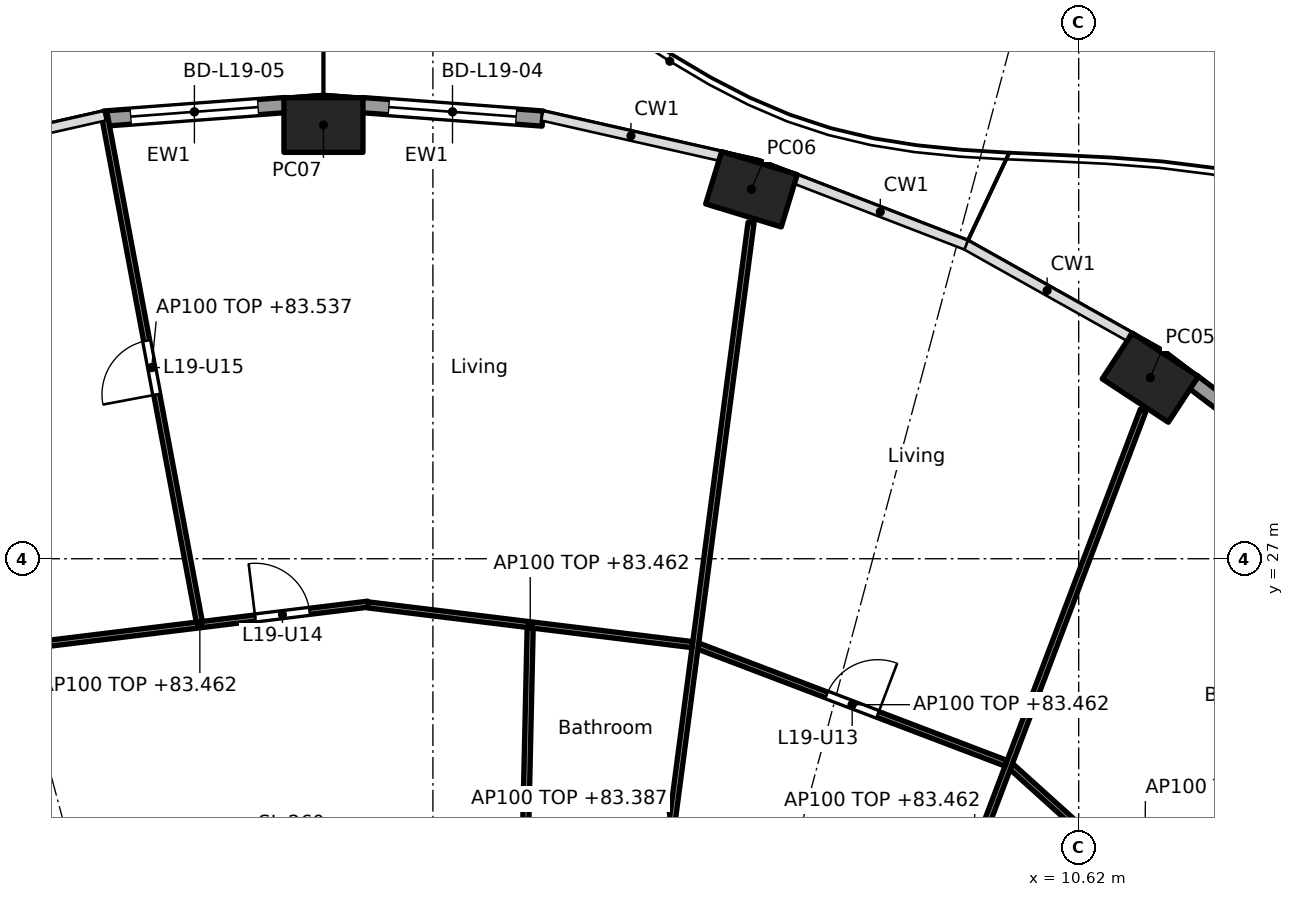
"""IFC4 building model, lengths in metres.
Left out: names, types, materials, properties, quantities, classifications, styles, units other than length and angle.
Written with IfcOpenShell. Run it as: python <this file> out.ifc"""

import sys

from ifc_helpers import new_model, si_unit, direction, frame, frame_2d, origin, origin_2d, place, context, subcontext, project, spatial, rectangle, hollow_rectangle, extrude, element, fill, save


model = new_model("IFC4")
c1 = context("Model", 3, precision=1e-05, world=origin(), true_north=direction((0.0, 1.0)))
c2 = subcontext(c1, "Body", "Model", "MODEL_VIEW")
j1 = project(units=[si_unit("LENGTHUNIT", "METRE"), si_unit("PLANEANGLEUNIT", "RADIAN")], contexts=[c1])
p1 = place(None, origin())
s1 = spatial("IfcSite", under=j1, at=p1, CompositionType="ELEMENT")
p2 = place(p1, origin())
s2 = spatial("IfcBuilding", under=s1, at=p2, CompositionType="ELEMENT")
p3 = place(p2, frame((0.0, 0.0, 80.7)))
s3 = spatial("IfcBuildingStorey", under=s2, at=p3, CompositionType="ELEMENT", Elevation=80.7)
for number, where, z_axis, x_axis in (
    (1, (11.798, 29.978, 0.0), (0.0, 0.0, 1.0), (-0.836, 0.549, 0.0)),
    (2, (5.239, 33.076, 0.0), (0.0, 0.0, 1.0), (-0.957, 0.292, 0.0)),
    (3, (-1.8, 34.133, 0.0), (0.0, 0.0, 1.0), (-1.0, 0.0, 0.0)),
):
    element("IfcColumn", number, at=place(p3, frame(where, z_axis=z_axis, x_axis=x_axis)), inside=s3, PredefinedType="COLUMN", context=c2, shape_type="SweptSolid", body=[
        extrude(hollow_rectangle(XDim=1.3, YDim=0.9, WallThickness=0.045, at=origin_2d()), origin(), (0.0, 0.0, 1.0), 3.7),
    ])
p4 = place(p3, frame((12.489, 29.917, 0.0), z_axis=(0.0, 0.0, 1.0), x_axis=(0.796037575978, -0.605247203736, 0.0)))
e4 = element("IfcWall", 4, at=p4, inside=s3, PredefinedType="SOLIDWALL", context=c2, shape_type="SweptSolid", body=[
    extrude(rectangle(XDim=3.134, YDim=0.25, at=frame_2d((1.567, 0.0))), origin(), (0.0, 0.0, 1.0), 3.44),
])
p5 = place(p4, frame((0.517, 0.0, 0.0)))
e5 = element("IfcOpeningElement", 5, at=p5, cuts=e4, PredefinedType="OPENING", context=c2, shape_type="SweptSolid", body=[
    extrude(rectangle(XDim=2.1, YDim=2.4, at=frame_2d((1.05, 1.2))), frame((0.0, 0.135, 0.0), z_axis=(0.0, -1.0, 0.0), x_axis=(1.0, 0.0, 0.0)), (0.0, 0.0, 1.0), 0.27),
])
p6 = place(p3, frame((-1.161, 34.46, 0.0), z_axis=(0.0, 0.0, 1.0), x_axis=(0.997232262224, -0.074349278273, 0.0)))
e6 = element("IfcWall", 6, at=p6, inside=s3, PredefinedType="SOLIDWALL", context=c2, shape_type="SweptSolid", body=[
    extrude(rectangle(XDim=2.975, YDim=0.25, at=frame_2d((1.488, 0.0))), origin(), (0.0, 0.0, 1.0), 3.44),
])
p7 = place(p6, frame((0.438, 0.0, 0.0)))
e7 = element("IfcOpeningElement", 7, at=p7, cuts=e6, PredefinedType="OPENING", context=c2, shape_type="SweptSolid", body=[
    extrude(rectangle(XDim=2.1, YDim=2.4, at=frame_2d((1.05, 1.2))), frame((0.0, 0.135, 0.0), z_axis=(0.0, -1.0, 0.0), x_axis=(1.0, 0.0, 0.0)), (0.0, 0.0, 1.0), 0.27),
])
p8 = place(p3, frame((-5.406, 34.239, 0.0), z_axis=(0.0, 0.0, 1.0), x_axis=(0.997231808538, 0.074355363224, 0.0)))
e8 = element("IfcWall", 8, at=p8, inside=s3, PredefinedType="SOLIDWALL", context=c2, shape_type="SweptSolid", body=[
    extrude(rectangle(XDim=2.975, YDim=0.25, at=frame_2d((1.487, 0.0))), origin(), (0.0, 0.0, 1.0), 3.44),
])
p9 = place(p8, frame((0.438, 0.0, 0.0)))
e9 = element("IfcOpeningElement", 9, at=p9, cuts=e8, PredefinedType="OPENING", context=c2, shape_type="SweptSolid", body=[
    extrude(rectangle(XDim=2.1, YDim=2.4, at=frame_2d((1.05, 1.2))), frame((0.0, 0.135, 0.0), z_axis=(0.0, -1.0, 0.0), x_axis=(1.0, 0.0, 0.0)), (0.0, 0.0, 1.0), 0.27),
])
p10 = place(p3, frame((7.713, 10.195, 0.0), z_axis=(0.0, 0.0, 1.0), x_axis=(0.552111071171, 0.833770571015, 0.0)))
e10 = element("IfcWall", 10, at=p10, inside=s3, PredefinedType="PARTITIONING", context=c2, shape_type="SweptSolid", body=[
    extrude(rectangle(XDim=17.208, YDim=0.1, at=frame_2d((8.604, 0.0))), origin(), (0.0, 0.0, 1.0), 2.687),
])
p11 = place(p10, frame((1.976, 0.0, 0.0)))
e11 = element("IfcOpeningElement", 11, at=p11, cuts=e10, PredefinedType="OPENING", context=c2, shape_type="SweptSolid", body=[
    extrude(rectangle(XDim=0.9, YDim=2.1, at=frame_2d((0.45, 1.05))), frame((0.0, 0.06, 0.0), z_axis=(0.0, -1.0, 0.0), x_axis=(1.0, 0.0, 0.0)), (0.0, 0.0, 1.0), 0.12),
])
p12 = place(p10, frame((7.611, 0.0, 0.0)))
e12 = element("IfcOpeningElement", 12, at=p12, cuts=e10, PredefinedType="OPENING", context=c2, shape_type="SweptSolid", body=[
    extrude(rectangle(XDim=0.9, YDim=2.1, at=frame_2d((0.45, 1.05))), frame((0.0, 0.06, 0.0), z_axis=(0.0, -1.0, 0.0), x_axis=(1.0, 0.0, 0.0)), (0.0, 0.0, 1.0), 0.12),
])
p13 = place(p3, frame((13.898, 19.625, 0.0), z_axis=(0.0, 0.0, 1.0), x_axis=(-0.742400132046, 0.669956747812, 0.0)))
e13 = element("IfcWall", 13, at=p13, inside=s3, PredefinedType="PARTITIONING", context=c2, shape_type="SweptSolid", body=[
    extrude(rectangle(XDim=5.911, YDim=0.1, at=frame_2d((2.956, 0.0))), origin(), (0.0, 0.0, 1.0), 2.762),
])
p14 = place(p13, frame((2.506, 0.0, 0.0)))
e14 = element("IfcOpeningElement", 14, at=p14, cuts=e13, PredefinedType="OPENING", context=c2, shape_type="SweptSolid", body=[
    extrude(rectangle(XDim=0.9, YDim=2.1, at=frame_2d((0.45, 1.05))), frame((0.0, 0.06, 0.0), z_axis=(0.0, -1.0, 0.0), x_axis=(1.0, 0.0, 0.0)), (0.0, 0.0, 1.0), 0.12),
])
p15 = place(p3, frame((6.141, 14.829, 0.0), z_axis=(0.0, 0.0, 1.0), x_axis=(0.354477134193, 0.935064682968, 0.0)))
e15 = element("IfcWall", 15, at=p15, inside=s3, PredefinedType="PARTITIONING", context=c2, shape_type="SweptSolid", body=[
    extrude(rectangle(XDim=15.626, YDim=0.1, at=frame_2d((7.813, 0.0))), origin(), (0.0, 0.0, 1.0), 2.762),
])
p16 = place(p15, frame((1.35, 0.0, 0.0)))
e16 = element("IfcOpeningElement", 16, at=p16, cuts=e15, PredefinedType="OPENING", context=c2, shape_type="SweptSolid", body=[
    extrude(rectangle(XDim=0.9, YDim=2.1, at=frame_2d((0.45, 1.05))), frame((0.0, 0.06, 0.0), z_axis=(0.0, -1.0, 0.0), x_axis=(1.0, 0.0, 0.0)), (0.0, 0.0, 1.0), 0.12),
])
p17 = place(p15, frame((5.606, 0.0, 0.0)))
e17 = element("IfcOpeningElement", 17, at=p17, cuts=e15, PredefinedType="OPENING", context=c2, shape_type="SweptSolid", body=[
    extrude(rectangle(XDim=0.9, YDim=2.1, at=frame_2d((0.45, 1.05))), frame((0.0, 0.06, 0.0), z_axis=(0.0, -1.0, 0.0), x_axis=(1.0, 0.0, 0.0)), (0.0, 0.0, 1.0), 0.12),
])
p18 = place(p3, frame((9.426, 23.637, 0.0), z_axis=(0.0, 0.0, 1.0), x_axis=(-0.93461405629, 0.355663557011, 0.0)))
e18 = element("IfcWall", 18, at=p18, inside=s3, PredefinedType="PARTITIONING", context=c2, shape_type="SweptSolid", body=[
    extrude(rectangle(XDim=5.417, YDim=0.1, at=frame_2d((2.708, 0.0))), origin(), (0.0, 0.0, 1.0), 2.762),
])
p19 = place(p18, frame((2.258, 0.0, 0.0)))
e19 = element("IfcOpeningElement", 19, at=p19, cuts=e18, PredefinedType="OPENING", context=c2, shape_type="SweptSolid", body=[
    extrude(rectangle(XDim=0.9, YDim=2.1, at=frame_2d((0.45, 1.05))), frame((0.0, 0.06, 0.0), z_axis=(0.0, -1.0, 0.0), x_axis=(1.0, 0.0, 0.0)), (0.0, 0.0, 1.0), 0.12),
])
p20 = place(p3, frame((2.615, 12.664, 0.0), z_axis=(0.0, 0.0, 1.0), x_axis=(0.130614967904, 0.99143316979, 0.0)))
e20 = element("IfcWall", 20, at=p20, inside=s3, PredefinedType="PARTITIONING", context=c2, shape_type="SweptSolid", body=[
    extrude(rectangle(XDim=20.034, YDim=0.1, at=frame_2d((10.017, 0.0))), origin(), (0.0, 0.0, 1.0), 2.687),
])
p21 = place(p20, frame((2.359, 0.0, 0.0)))
e21 = element("IfcOpeningElement", 21, at=p21, cuts=e20, PredefinedType="OPENING", context=c2, shape_type="SweptSolid", body=[
    extrude(rectangle(XDim=0.9, YDim=2.1, at=frame_2d((0.45, 1.05))), frame((0.0, 0.06, 0.0), z_axis=(0.0, -1.0, 0.0), x_axis=(1.0, 0.0, 0.0)), (0.0, 0.0, 1.0), 0.12),
])
p22 = place(p20, frame((8.873, 0.0, 0.0)))
e22 = element("IfcOpeningElement", 22, at=p22, cuts=e20, PredefinedType="OPENING", context=c2, shape_type="SweptSolid", body=[
    extrude(rectangle(XDim=0.9, YDim=2.1, at=frame_2d((0.45, 1.05))), frame((0.0, 0.06, 0.0), z_axis=(0.0, -1.0, 0.0), x_axis=(1.0, 0.0, 0.0)), (0.0, 0.0, 1.0), 0.12),
])
p23 = place(p3, frame((4.267, 25.587, 0.0), z_axis=(0.0, 0.0, 1.0), x_axis=(-0.992576206119, 0.121624319302, 0.0)))
e23 = element("IfcWall", 23, at=p23, inside=s3, PredefinedType="PARTITIONING", context=c2, shape_type="SweptSolid", body=[
    extrude(rectangle(XDim=5.374, YDim=0.1, at=frame_2d((2.687, 0.0))), origin(), (0.0, 0.0, 1.0), 2.762),
])
p24 = place(p3, frame((1.433, 18.428, 0.0), z_axis=(0.0, 0.0, 1.0), x_axis=(0.022419421812, 0.999748653175, 0.0)))
e24 = element("IfcWall", 24, at=p24, inside=s3, PredefinedType="PARTITIONING", context=c2, shape_type="SweptSolid", body=[
    extrude(rectangle(XDim=7.438, YDim=0.1, at=frame_2d((3.719, 0.0))), origin(), (0.0, 0.0, 1.0), 3.44),
])
p25 = place(p3, frame((-1.066, 26.253, 0.0), z_axis=(0.0, 0.0, 1.0), x_axis=(-0.992574197255, -0.121640712523, 0.0)))
e25 = element("IfcWall", 25, at=p25, inside=s3, PredefinedType="PARTITIONING", context=c2, shape_type="SweptSolid", body=[
    extrude(rectangle(XDim=5.574, YDim=0.1, at=frame_2d((2.787, 0.0))), origin(), (0.0, 0.0, 1.0), 2.762),
])
p26 = place(p25, frame((0.969, 0.0, 0.0)))
e26 = element("IfcOpeningElement", 26, at=p26, cuts=e25, PredefinedType="OPENING", context=c2, shape_type="SweptSolid", body=[
    extrude(rectangle(XDim=0.9, YDim=2.1, at=frame_2d((0.45, 1.05))), frame((0.0, 0.06, 0.0), z_axis=(0.0, -1.0, 0.0), x_axis=(1.0, 0.0, 0.0)), (0.0, 0.0, 1.0), 0.12),
])
p27 = place(p3, frame((-3.842, 25.963, 0.0), z_axis=(0.0, 0.0, 1.0), x_axis=(-0.184068442651, 0.982913428752, 0.0)))
e27 = element("IfcWall", 27, at=p27, inside=s3, PredefinedType="PARTITIONING", context=c2, shape_type="SweptSolid", body=[
    extrude(rectangle(XDim=8.506, YDim=0.1, at=frame_2d((4.253, 0.0))), origin(), (0.0, 0.0, 1.0), 2.837),
])
p28 = place(p27, frame((3.803, 0.0, 0.0)))
e28 = element("IfcOpeningElement", 28, at=p28, cuts=e27, PredefinedType="OPENING", context=c2, shape_type="SweptSolid", body=[
    extrude(rectangle(XDim=0.9, YDim=2.1, at=frame_2d((0.45, 1.05))), frame((0.0, 0.06, 0.0), z_axis=(0.0, -1.0, 0.0), x_axis=(1.0, 0.0, 0.0)), (0.0, 0.0, 1.0), 0.12),
])
p29 = place(p3, frame((-6.072, 17.915, 0.0), z_axis=(0.0, 0.0, 1.0), x_axis=(-0.404139814253, 0.914697223422, 0.0)))
e29 = element("IfcWall", 29, at=p29, inside=s3, PredefinedType="PARTITIONING", context=c2, shape_type="SweptSolid", body=[
    extrude(rectangle(XDim=15.614, YDim=0.1, at=frame_2d((7.807, 0.0))), origin(), (0.0, 0.0, 1.0), 2.837),
])
p30 = place(p29, frame((3.226, 0.0, 0.0)))
e30 = element("IfcOpeningElement", 30, at=p30, cuts=e29, PredefinedType="OPENING", context=c2, shape_type="SweptSolid", body=[
    extrude(rectangle(XDim=0.9, YDim=2.1, at=frame_2d((0.45, 1.05))), frame((0.0, 0.06, 0.0), z_axis=(0.0, -1.0, 0.0), x_axis=(1.0, 0.0, 0.0)), (0.0, 0.0, 1.0), 0.12),
])
p31 = place(p7, origin())
e31 = element("IfcDoor", 31, at=p31, inside=s3, OperationType="SLIDING_TO_LEFT", PredefinedType="DOOR", context=c2, shape_type="SweptSolid", body=[
    extrude(rectangle(XDim=2.1, YDim=2.4, at=frame_2d((1.05, 1.2))), frame((0.0, 0.025, 0.0), z_axis=(0.0, -1.0, 0.0), x_axis=(1.0, 0.0, 0.0)), (0.0, 0.0, 1.0), 0.05),
])
fill(e7, e31)
p32 = place(p9, origin())
e32 = element("IfcDoor", 32, at=p32, inside=s3, OperationType="SLIDING_TO_LEFT", PredefinedType="DOOR", context=c2, shape_type="SweptSolid", body=[
    extrude(rectangle(XDim=2.1, YDim=2.4, at=frame_2d((1.05, 1.2))), frame((0.0, 0.025, 0.0), z_axis=(0.0, -1.0, 0.0), x_axis=(1.0, 0.0, 0.0)), (0.0, 0.0, 1.0), 0.05),
])
fill(e9, e32)
p33 = place(p19, frame((0.9, 0.0, 0.0), x_axis=(-1.0, 0.0, 0.0)))
e33 = element("IfcDoor", 33, at=p33, inside=s3, OperationType="SINGLE_SWING_RIGHT", PredefinedType="DOOR", context=c2, shape_type="SweptSolid", body=[
    extrude(rectangle(XDim=0.9, YDim=2.1, at=frame_2d((0.45, 1.05))), frame((0.0, 0.025, 0.0), z_axis=(0.0, -1.0, 0.0), x_axis=(1.0, 0.0, 0.0)), (0.0, 0.0, 1.0), 0.05),
])
fill(e19, e33)
p34 = place(p26, frame((0.9, 0.0, 0.0), x_axis=(-1.0, 0.0, 0.0)))
e34 = element("IfcDoor", 34, at=p34, inside=s3, OperationType="SINGLE_SWING_LEFT", PredefinedType="DOOR", context=c2, shape_type="SweptSolid", body=[
    extrude(rectangle(XDim=0.9, YDim=2.1, at=frame_2d((0.45, 1.05))), frame((0.0, 0.025, 0.0), z_axis=(0.0, -1.0, 0.0), x_axis=(1.0, 0.0, 0.0)), (0.0, 0.0, 1.0), 0.05),
])
fill(e26, e34)
p35 = place(p28, origin())
e35 = element("IfcDoor", 35, at=p35, inside=s3, OperationType="SINGLE_SWING_LEFT", PredefinedType="DOOR", context=c2, shape_type="SweptSolid", body=[
    extrude(rectangle(XDim=0.9, YDim=2.1, at=frame_2d((0.45, 1.05))), frame((0.0, 0.025, 0.0), z_axis=(0.0, -1.0, 0.0), x_axis=(1.0, 0.0, 0.0)), (0.0, 0.0, 1.0), 0.05),
])
fill(e28, e35)
save(model, sys.argv[1])
